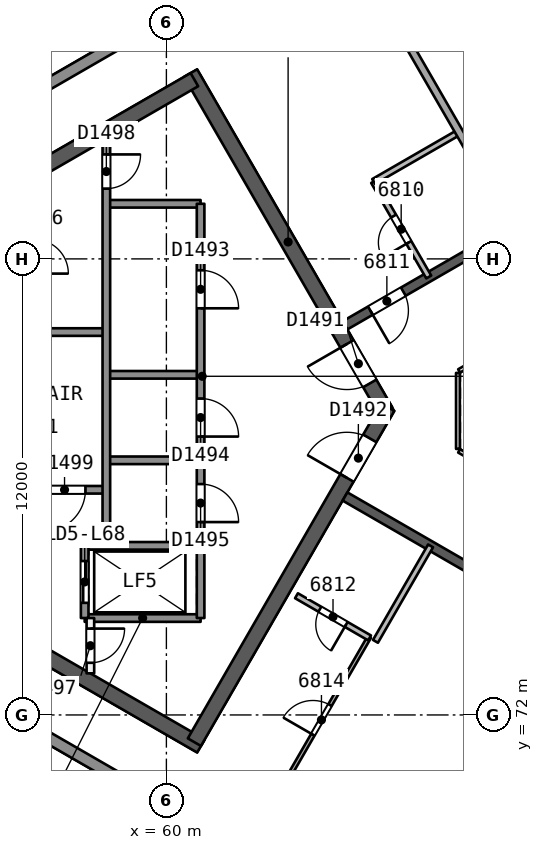
"""IFC4 building model, lengths in metres.
Left out: names, types, materials, properties, quantities, classifications, styles, units other than length and angle.
Written with IfcOpenShell. Run it as: python <this file> out.ifc"""

import sys

from ifc_helpers import new_model, si_unit, direction, frame, frame_2d, origin, place, context, subcontext, project, spatial, rectangle, extrude, element, fill, save


model = new_model("IFC4")
c1 = context("Model", 3, precision=1e-05, world=origin(), true_north=direction((0.0, 1.0)))
c2 = subcontext(c1, "Body", "Model", "MODEL_VIEW")
j1 = project(units=[si_unit("LENGTHUNIT", "METRE"), si_unit("PLANEANGLEUNIT", "RADIAN")], contexts=[c1])
p1 = place(None, origin())
s1 = spatial("IfcSite", under=j1, at=p1, CompositionType="ELEMENT")
p2 = place(p1, origin())
s2 = spatial("IfcBuilding", under=s1, at=p2, CompositionType="ELEMENT")
p3 = place(p2, frame((0.0, 0.0, 277.5)))
s3 = spatial("IfcBuildingStorey", under=s2, at=p3, CompositionType="ELEMENT", Elevation=277.5)
p4 = place(p3, frame((65.769, 80.0, 0.0), z_axis=(0.0, 0.0, 1.0), x_axis=(-0.50000177223, 0.866024380585, 0.0)))
e1 = element("IfcWall", 1, at=p4, inside=s3, PredefinedType="SHEAR", context=c2, shape_type="SweptSolid", body=[
    extrude(rectangle(XDim=10.265, YDim=0.4, at=frame_2d((5.132, 0.0))), origin(), (0.0, 0.0, 1.0), 3.7),
])
p5 = place(p4, frame((0.834, 0.0, 0.0)))
e2 = element("IfcOpeningElement", 2, at=p5, cuts=e1, PredefinedType="OPENING", context=c2, shape_type="SweptSolid", body=[
    extrude(rectangle(XDim=1.2, YDim=2.1, at=frame_2d((0.6, 1.05))), frame((0.0, 0.21, 0.0), z_axis=(0.0, -1.0, 0.0), x_axis=(1.0, 0.0, 0.0)), (0.0, 0.0, 1.0), 0.421),
])
p6 = place(p3, frame((60.737, 88.716, 0.0), z_axis=(0.0, 0.0, 1.0), x_axis=(-0.866028812667, -0.499994095595, 0.0)))
e3 = element("IfcWall", 3, at=p6, inside=s3, PredefinedType="SHEAR", context=c2, shape_type="SweptSolid", body=[
    extrude(rectangle(XDim=14.134, YDim=0.4, at=frame_2d((7.067, 0.0))), origin(), (0.0, 0.0, 1.0), 3.7),
])
p7 = place(p3, frame((48.597, 78.293, 0.0), z_axis=(0.0, 0.0, 1.0), x_axis=(0.866026024469, -0.499998924941, 0.0)))
e4 = element("IfcWall", 4, at=p7, inside=s3, PredefinedType="SHEAR", context=c2, shape_type="SweptSolid", body=[
    extrude(rectangle(XDim=14.218, YDim=0.4, at=frame_2d((7.109, 0.0))), origin(), (0.0, 0.0, 1.0), 3.7),
])
p8 = place(p3, frame((60.737, 71.284, 0.0), z_axis=(0.0, 0.0, 1.0), x_axis=(0.50000547566, 0.866022242388, 0.0)))
e5 = element("IfcWall", 5, at=p8, inside=s3, PredefinedType="SHEAR", context=c2, shape_type="SweptSolid", body=[
    extrude(rectangle(XDim=10.18, YDim=0.4, at=frame_2d((5.09, 0.0))), origin(), (0.0, 0.0, 1.0), 3.7),
])
p9 = place(p8, frame((8.03, 0.0, 0.0)))
e6 = element("IfcOpeningElement", 6, at=p9, cuts=e5, PredefinedType="OPENING", context=c2, shape_type="SweptSolid", body=[
    extrude(rectangle(XDim=1.2, YDim=2.1, at=frame_2d((0.6, 1.05))), frame((0.0, 0.21, 0.0), z_axis=(0.0, -1.0, 0.0), x_axis=(1.0, 0.0, 0.0)), (0.0, 0.0, 1.0), 0.421),
])
p10 = place(p3, frame((78.2, 90.046, 0.0), z_axis=(0.0, 0.0, 1.0), x_axis=(-0.866026492143, -0.499998114903, 0.0)))
e7 = element("IfcWall", 7, at=p10, inside=s3, PredefinedType="SHEAR", context=c2, shape_type="SweptSolid", body=[
    extrude(rectangle(XDim=15.588, YDim=0.25, at=frame_2d((7.794, 0.0))), origin(), (0.0, 0.0, 1.0), 3.3),
])
p11 = place(p10, frame((3.372, 0.0, 0.0)))
e8 = element("IfcOpeningElement", 8, at=p11, cuts=e7, PredefinedType="OPENING", context=c2, shape_type="SweptSolid", body=[
    extrude(rectangle(XDim=1.0, YDim=2.1, at=frame_2d((0.5, 1.05))), frame((0.0, 0.135, 0.0), z_axis=(0.0, -1.0, 0.0), x_axis=(1.0, 0.0, 0.0)), (0.0, 0.0, 1.0), 0.271),
])
p12 = place(p10, frame((8.594, 0.0, 0.0)))
e9 = element("IfcOpeningElement", 9, at=p12, cuts=e7, PredefinedType="OPENING", context=c2, shape_type="SweptSolid", body=[
    extrude(rectangle(XDim=1.0, YDim=2.1, at=frame_2d((0.5, 1.05))), frame((0.0, 0.135, 0.0), z_axis=(0.0, -1.0, 0.0), x_axis=(1.0, 0.0, 0.0)), (0.0, 0.0, 1.0), 0.271),
])
p13 = place(p10, frame((13.816, 0.0, 0.0)))
e10 = element("IfcOpeningElement", 10, at=p13, cuts=e7, PredefinedType="OPENING", context=c2, shape_type="SweptSolid", body=[
    extrude(rectangle(XDim=1.0, YDim=2.1, at=frame_2d((0.5, 1.05))), frame((0.0, 0.135, 0.0), z_axis=(0.0, -1.0, 0.0), x_axis=(1.0, 0.0, 0.0)), (0.0, 0.0, 1.0), 0.271),
])
p14 = place(p3, frame((64.7, 77.748, 0.0), z_axis=(0.0, 0.0, 1.0), x_axis=(0.866026492143, -0.499998114903, 0.0)))
e11 = element("IfcWall", 11, at=p14, inside=s3, PredefinedType="SHEAR", context=c2, shape_type="SweptSolid", body=[
    extrude(rectangle(XDim=15.588, YDim=0.25, at=frame_2d((7.794, 0.0))), origin(), (0.0, 0.0, 1.0), 3.3),
])
p15 = place(p14, frame((4.473, 0.0, 0.0)))
e12 = element("IfcOpeningElement", 12, at=p15, cuts=e11, PredefinedType="OPENING", context=c2, shape_type="SweptSolid", body=[
    extrude(rectangle(XDim=1.0, YDim=2.1, at=frame_2d((0.5, 1.05))), frame((0.0, 0.135, 0.0), z_axis=(0.0, -1.0, 0.0), x_axis=(1.0, 0.0, 0.0)), (0.0, 0.0, 1.0), 0.271),
])
p16 = place(p14, frame((13.917, 0.0, 0.0)))
e13 = element("IfcOpeningElement", 13, at=p16, cuts=e11, PredefinedType="OPENING", context=c2, shape_type="SweptSolid", body=[
    extrude(rectangle(XDim=1.1, YDim=2.1, at=frame_2d((0.55, 1.05))), frame((0.0, 0.135, 0.0), z_axis=(0.0, -1.0, 0.0), x_axis=(1.0, 0.0, 0.0)), (0.0, 0.0, 1.0), 0.271),
])
p17 = place(p3, frame((64.528, 92.838, 0.0), z_axis=(0.0, 0.0, 1.0), x_axis=(0.500006385204, -0.866021717254, 0.0)))
e14 = element("IfcWall", 14, at=p17, inside=s3, PredefinedType="PARTITIONING", context=c2, shape_type="SweptSolid", body=[
    extrude(rectangle(XDim=9.254, YDim=0.2, at=frame_2d((4.627, 0.0))), origin(), (0.0, 0.0, 1.0), 3.3),
])
p18 = place(p3, frame((66.903, 83.524, 0.0), z_axis=(0.0, 0.0, 1.0), x_axis=(-0.499987231761, 0.866032775405, 0.0)))
e15 = element("IfcWall", 15, at=p18, inside=s3, PredefinedType="PARTITIONING", context=c2, shape_type="SweptSolid", body=[
    extrude(rectangle(XDim=2.9, YDim=0.15, at=frame_2d((1.45, 0.0))), origin(), (0.0, 0.0, 1.0), 3.3),
])
p19 = place(p18, frame((1.05, 0.0, 0.0)))
e16 = element("IfcOpeningElement", 16, at=p19, cuts=e15, PredefinedType="OPENING", context=c2, shape_type="SweptSolid", body=[
    extrude(rectangle(XDim=0.8, YDim=2.1, at=frame_2d((0.4, 1.05))), frame((0.0, 0.085, 0.0), z_axis=(0.0, -1.0, 0.0), x_axis=(1.0, 0.0, 0.0)), (0.0, 0.0, 1.0), 0.171),
])
p20 = place(p3, frame((65.453, 86.035, 0.0), z_axis=(0.0, 0.0, 1.0), x_axis=(0.866021400173, 0.500006934395, 0.0)))
e17 = element("IfcWall", 17, at=p20, inside=s3, PredefinedType="PARTITIONING", context=c2, shape_type="SweptSolid", body=[
    extrude(rectangle(XDim=2.6, YDim=0.15, at=frame_2d((1.3, 0.0))), origin(), (0.0, 0.0, 1.0), 3.3),
])
p21 = place(p3, frame((62.154, 68.534, 0.0), z_axis=(0.0, 0.0, 1.0), x_axis=(0.499987773676, 0.866032462541, 0.0)))
e18 = element("IfcWall", 18, at=p21, inside=s3, PredefinedType="PARTITIONING", context=c2, shape_type="SweptSolid", body=[
    extrude(rectangle(XDim=6.372, YDim=0.1, at=frame_2d((3.186, 0.0))), origin(), (0.0, 0.0, 1.0), 3.3),
])
p22 = place(p21, frame((3.403, 0.0, 0.0)))
e19 = element("IfcOpeningElement", 19, at=p22, cuts=e18, PredefinedType="OPENING", context=c2, shape_type="SweptSolid", body=[
    extrude(rectangle(XDim=0.9, YDim=2.1, at=frame_2d((0.45, 1.05))), frame((0.0, 0.061, 0.0), z_axis=(0.0, -1.0, 0.0), x_axis=(1.0, 0.0, 0.0)), (0.0, 0.0, 1.0), 0.121),
])
p23 = place(p3, frame((65.347, 74.026, 0.0), z_axis=(0.0, 0.0, 1.0), x_axis=(-0.866042797968, 0.49996987118, 0.0)))
e20 = element("IfcWall", 20, at=p23, inside=s3, PredefinedType="PARTITIONING", context=c2, shape_type="SweptSolid", body=[
    extrude(rectangle(XDim=2.221, YDim=0.15, at=frame_2d((1.11, 0.0))), origin(), (0.0, 0.0, 1.0), 3.3),
])
p24 = place(p23, frame((0.711, 0.0, 0.0)))
e21 = element("IfcOpeningElement", 21, at=p24, cuts=e20, PredefinedType="OPENING", context=c2, shape_type="SweptSolid", body=[
    extrude(rectangle(XDim=0.8, YDim=2.1, at=frame_2d((0.4, 1.05))), frame((0.0, 0.085, 0.0), z_axis=(0.0, -1.0, 0.0), x_axis=(1.0, 0.0, 0.0)), (0.0, 0.0, 1.0), 0.171),
])
p25 = place(p3, frame((66.952, 76.448, 0.0), z_axis=(0.0, 0.0, 1.0), x_axis=(-0.499987231761, -0.866032775405, 0.0)))
e22 = element("IfcWall", 22, at=p25, inside=s3, PredefinedType="PARTITIONING", context=c2, shape_type="SweptSolid", body=[
    extrude(rectangle(XDim=2.9, YDim=0.15, at=frame_2d((1.45, 0.0))), origin(), (0.0, 0.0, 1.0), 3.3),
])
p26 = place(p3, frame((46.198, 82.427, 0.0), z_axis=(0.0, 0.0, 1.0), x_axis=(0.866024279277, 0.500001947699, 0.0)))
e23 = element("IfcWall", 23, at=p26, inside=s3, PredefinedType="SOLIDWALL", context=c2, shape_type="SweptSolid", body=[
    extrude(rectangle(XDim=47.46, YDim=0.3, at=frame_2d((23.73, 0.0))), origin(), (0.0, 0.0, 1.0), 3.3),
])
p27 = place(p26, frame((17.308, 0.0, 0.0)))
e24 = element("IfcOpeningElement", 24, at=p27, cuts=e23, PredefinedType="OPENING", context=c2, shape_type="SweptSolid", body=[
    extrude(rectangle(XDim=2.4, YDim=2.4, at=frame_2d((1.2, 1.2))), frame((0.0, 0.161, 0.0), z_axis=(0.0, -1.0, 0.0), x_axis=(1.0, 0.0, 0.0)), (0.0, 0.0, 1.0), 0.321),
])
p28 = place(p26, frame((22.53, 0.0, 0.0)))
e25 = element("IfcOpeningElement", 25, at=p28, cuts=e23, PredefinedType="OPENING", context=c2, shape_type="SweptSolid", body=[
    extrude(rectangle(XDim=2.4, YDim=2.4, at=frame_2d((1.2, 1.2))), frame((0.0, 0.161, 0.0), z_axis=(0.0, -1.0, 0.0), x_axis=(1.0, 0.0, 0.0)), (0.0, 0.0, 1.0), 0.321),
])
p29 = place(p26, frame((27.752, 0.0, 0.0)))
e26 = element("IfcOpeningElement", 26, at=p29, cuts=e23, PredefinedType="OPENING", context=c2, shape_type="SweptSolid", body=[
    extrude(rectangle(XDim=2.4, YDim=2.4, at=frame_2d((1.2, 1.2))), frame((0.0, 0.161, 0.0), z_axis=(0.0, -1.0, 0.0), x_axis=(1.0, 0.0, 0.0)), (0.0, 0.0, 1.0), 0.321),
])
p30 = place(p3, frame((87.299, 53.843, 0.0), z_axis=(0.0, 0.0, 1.0), x_axis=(-0.866024279277, 0.500001947699, 0.0)))
e27 = element("IfcWall", 27, at=p30, inside=s3, PredefinedType="SOLIDWALL", context=c2, shape_type="SweptSolid", body=[
    extrude(rectangle(XDim=47.46, YDim=0.3, at=frame_2d((23.73, 0.0))), origin(), (0.0, 0.0, 1.0), 3.3),
])
p31 = place(p30, frame((17.308, 0.0, 0.0)))
e28 = element("IfcOpeningElement", 28, at=p31, cuts=e27, PredefinedType="OPENING", context=c2, shape_type="SweptSolid", body=[
    extrude(rectangle(XDim=2.4, YDim=2.4, at=frame_2d((1.2, 1.2))), frame((0.0, 0.161, 0.0), z_axis=(0.0, -1.0, 0.0), x_axis=(1.0, 0.0, 0.0)), (0.0, 0.0, 1.0), 0.321),
])
p32 = place(p30, frame((37.135, 0.0, 0.0)))
e29 = element("IfcOpeningElement", 29, at=p32, cuts=e27, PredefinedType="OPENING", context=c2, shape_type="SweptSolid", body=[
    extrude(rectangle(XDim=2.4, YDim=2.4, at=frame_2d((1.2, 1.2))), frame((0.0, 0.161, 0.0), z_axis=(0.0, -1.0, 0.0), x_axis=(1.0, 0.0, 0.0)), (0.0, 0.0, 1.0), 0.321),
])
p33 = place(p30, frame((23.901, 0.0, 0.0)))
e30 = element("IfcOpeningElement", 30, at=p33, cuts=e27, PredefinedType="OPENING", context=c2, shape_type="SweptSolid", body=[
    extrude(rectangle(XDim=2.4, YDim=2.4, at=frame_2d((1.2, 1.2))), frame((0.0, 0.161, 0.0), z_axis=(0.0, -1.0, 0.0), x_axis=(1.0, 0.0, 0.0)), (0.0, 0.0, 1.0), 0.321),
])
p34 = place(p3, frame((60.9, 85.45, 0.0), z_axis=(0.0, 0.0, 1.0), x_axis=(-1.0, 0.0, 0.0)))
e31 = element("IfcWall", 31, at=p34, inside=s3, PredefinedType="SOLIDWALL", context=c2, shape_type="SweptSolid", body=[
    extrude(rectangle(XDim=2.48, YDim=0.2, at=frame_2d((1.24, 0.0))), origin(), (0.0, 0.0, 1.0), 3.3),
])
p35 = place(p3, frame((58.42, 82.075, 0.0), z_axis=(0.0, 0.0, 1.0), x_axis=(-1.0, 0.0, 0.0)))
e32 = element("IfcWall", 32, at=p35, inside=s3, PredefinedType="SOLIDWALL", context=c2, shape_type="SweptSolid", body=[
    extrude(rectangle(XDim=7.7, YDim=0.2, at=frame_2d((3.85, 0.0))), origin(), (0.0, 0.0, 1.0), 3.3),
])
for number, where, z_axis, x_axis in (
    (33, (60.9, 80.95, 0.0), (0.0, 0.0, 1.0), (-1.0, 0.0, 0.0)),
    (34, (60.9, 78.7, 0.0), (0.0, 0.0, 1.0), (-1.0, 0.0, 0.0)),
):
    element("IfcWall", number, at=place(p3, frame(where, z_axis=z_axis, x_axis=x_axis)), inside=s3, PredefinedType="SOLIDWALL", context=c2, shape_type="SweptSolid", body=[
        extrude(rectangle(XDim=2.48, YDim=0.2, at=frame_2d((1.24, 0.0))), origin(), (0.0, 0.0, 1.0), 3.3),
    ])
p36 = place(p3, frame((58.42, 77.925, 0.0), z_axis=(0.0, 0.0, 1.0), x_axis=(-1.0, 0.0, 0.0)))
e35 = element("IfcWall", 35, at=p36, inside=s3, PredefinedType="SOLIDWALL", context=c2, shape_type="SweptSolid", body=[
    extrude(rectangle(XDim=7.7, YDim=0.2, at=frame_2d((3.85, 0.0))), origin(), (0.0, 0.0, 1.0), 3.3),
])
p37 = place(p36, frame((0.55, 0.0, 0.0)))
e36 = element("IfcOpeningElement", 36, at=p37, cuts=e35, PredefinedType="OPENING", context=c2, shape_type="SweptSolid", body=[
    extrude(rectangle(XDim=1.1, YDim=2.1, at=frame_2d((0.55, 1.05))), frame((0.0, 0.11, 0.0), z_axis=(0.0, -1.0, 0.0), x_axis=(1.0, 0.0, 0.0)), (0.0, 0.0, 1.0), 0.221),
])
for number, where, z_axis, x_axis in (
    (37, (60.9, 76.45, 0.0), (0.0, 0.0, 1.0), (-1.0, 0.0, 0.0)),
    (38, (60.9, 74.55, 0.0), (0.0, 0.0, 1.0), (-1.0, 0.0, 0.0)),
):
    element("IfcWall", number, at=place(p3, frame(where, z_axis=z_axis, x_axis=x_axis)), inside=s3, PredefinedType="SOLIDWALL", context=c2, shape_type="SweptSolid", body=[
        extrude(rectangle(XDim=3.05, YDim=0.2, at=frame_2d((1.525, 0.0))), origin(), (0.0, 0.0, 1.0), 3.3),
    ])
p38 = place(p3, frame((60.9, 85.45, 0.0), z_axis=(0.0, 0.0, 1.0), x_axis=(0.0, -1.0, 0.0)))
e39 = element("IfcWall", 39, at=p38, inside=s3, PredefinedType="SOLIDWALL", context=c2, shape_type="SweptSolid", body=[
    extrude(rectangle(XDim=10.9, YDim=0.2, at=frame_2d((5.45, 0.0))), origin(), (0.0, 0.0, 1.0), 3.3),
])
p39 = place(p38, frame((1.75, 0.0, 0.0)))
e40 = element("IfcOpeningElement", 40, at=p39, cuts=e39, PredefinedType="OPENING", context=c2, shape_type="SweptSolid", body=[
    extrude(rectangle(XDim=1.0, YDim=2.1, at=frame_2d((0.5, 1.05))), frame((0.0, 0.11, 0.0), z_axis=(0.0, -1.0, 0.0), x_axis=(1.0, 0.0, 0.0)), (0.0, 0.0, 1.0), 0.221),
])
p40 = place(p38, frame((5.125, 0.0, 0.0)))
e41 = element("IfcOpeningElement", 41, at=p40, cuts=e39, PredefinedType="OPENING", context=c2, shape_type="SweptSolid", body=[
    extrude(rectangle(XDim=1.0, YDim=2.1, at=frame_2d((0.5, 1.05))), frame((0.0, 0.11, 0.0), z_axis=(0.0, -1.0, 0.0), x_axis=(1.0, 0.0, 0.0)), (0.0, 0.0, 1.0), 0.221),
])
p41 = place(p38, frame((7.375, 0.0, 0.0)))
e42 = element("IfcOpeningElement", 42, at=p41, cuts=e39, PredefinedType="OPENING", context=c2, shape_type="SweptSolid", body=[
    extrude(rectangle(XDim=1.0, YDim=2.1, at=frame_2d((0.5, 1.05))), frame((0.0, 0.11, 0.0), z_axis=(0.0, -1.0, 0.0), x_axis=(1.0, 0.0, 0.0)), (0.0, 0.0, 1.0), 0.221),
])
p42 = place(p3, frame((58.42, 87.148, 0.0), z_axis=(0.0, 0.0, 1.0), x_axis=(0.0, -1.0, 0.0)))
e43 = element("IfcWall", 43, at=p42, inside=s3, PredefinedType="SOLIDWALL", context=c2, shape_type="SweptSolid", body=[
    extrude(rectangle(XDim=10.698, YDim=0.2, at=frame_2d((5.349, 0.0))), origin(), (0.0, 0.0, 1.0), 3.3),
])
p43 = place(p42, frame((0.399, 0.0, 0.0)))
e44 = element("IfcOpeningElement", 44, at=p43, cuts=e43, PredefinedType="OPENING", context=c2, shape_type="SweptSolid", body=[
    extrude(rectangle(XDim=0.9, YDim=2.1, at=frame_2d((0.45, 1.05))), frame((0.0, 0.11, 0.0), z_axis=(0.0, -1.0, 0.0), x_axis=(1.0, 0.0, 0.0)), (0.0, 0.0, 1.0), 0.221),
])
p44 = place(p3, frame((58.0, 74.55, 0.0), z_axis=(0.0, 0.0, 1.0), x_axis=(0.0, -1.0, 0.0)))
e45 = element("IfcWall", 45, at=p44, inside=s3, PredefinedType="PARTITIONING", context=c2, shape_type="SweptSolid", body=[
    extrude(rectangle(XDim=1.455, YDim=0.2, at=frame_2d((0.728, 0.0))), origin(), (0.0, 0.0, 1.0), 3.3),
])
p45 = place(p44, frame((0.278, 0.0, 0.0)))
e46 = element("IfcOpeningElement", 46, at=p45, cuts=e45, PredefinedType="OPENING", context=c2, shape_type="SweptSolid", body=[
    extrude(rectangle(XDim=0.9, YDim=2.1, at=frame_2d((0.45, 1.05))), frame((0.0, 0.11, 0.0), z_axis=(0.0, -1.0, 0.0), x_axis=(1.0, 0.0, 0.0)), (0.0, 0.0, 1.0), 0.221),
])
p46 = place(p3, frame((57.85, 76.45, 0.0), z_axis=(0.0, 0.0, 1.0), x_axis=(0.0, -1.0, 0.0)))
e47 = element("IfcWall", 47, at=p46, inside=s3, PredefinedType="SOLIDWALL", context=c2, shape_type="SweptSolid", body=[
    extrude(rectangle(XDim=1.9, YDim=0.2, at=frame_2d((0.95, 0.0))), origin(), (0.0, 0.0, 1.0), 3.3),
])
p47 = place(p46, frame((0.4, 0.0, 0.0)))
e48 = element("IfcOpeningElement", 48, at=p47, cuts=e47, PredefinedType="OPENING", context=c2, shape_type="SweptSolid", body=[
    extrude(rectangle(XDim=1.1, YDim=2.1, at=frame_2d((0.55, 1.05))), frame((0.0, 0.11, 0.0), z_axis=(0.0, -1.0, 0.0), x_axis=(1.0, 0.0, 0.0)), (0.0, 0.0, 1.0), 0.221),
])
p48 = place(p3, frame((77.738, 86.846, 0.0), z_axis=(0.0, 0.0, 1.0), x_axis=(-0.866026658274, -0.499997827154, 0.0)))
e49 = element("IfcWall", 49, at=p48, inside=s3, PredefinedType="PARTITIONING", context=c2, shape_type="SweptSolid", body=[
    extrude(rectangle(XDim=11.588, YDim=0.1, at=frame_2d((5.794, 0.0))), origin(), (0.0, 0.0, 1.0), 3.3),
])
p49 = place(p3, frame((67.672, 81.0, 0.0), z_axis=(0.0, 0.0, 1.0), x_axis=(0.0, -1.0, 0.0)))
e50 = element("IfcWall", 50, at=p49, inside=s3, PredefinedType="PARTITIONING", context=c2, shape_type="SweptSolid", body=[
    extrude(rectangle(XDim=2.0, YDim=0.1, at=frame_2d((1.0, 0.0))), origin(), (0.0, 0.0, 1.0), 3.3),
])
p50 = place(p3, frame((67.702, 78.948, 0.0), z_axis=(0.0, 0.0, 1.0), x_axis=(0.866026658274, -0.499997827154, 0.0)))
e51 = element("IfcWall", 51, at=p50, inside=s3, PredefinedType="PARTITIONING", context=c2, shape_type="SweptSolid", body=[
    extrude(rectangle(XDim=11.588, YDim=0.1, at=frame_2d((5.794, 0.0))), origin(), (0.0, 0.0, 1.0), 3.3),
])
p51 = place(p19, origin())
e52 = element("IfcDoor", 52, at=p51, inside=s3, OperationType="SINGLE_SWING_LEFT", PredefinedType="NOTDEFINED", context=c2, shape_type="SweptSolid", body=[
    extrude(rectangle(XDim=0.8, YDim=2.1, at=frame_2d((0.4, 1.05))), frame((0.0, 0.025, 0.0), z_axis=(0.0, -1.0, 0.0), x_axis=(1.0, 0.0, 0.0)), (0.0, 0.0, 1.0), 0.05),
])
fill(e16, e52)
p52 = place(p13, origin())
e53 = element("IfcDoor", 53, at=p52, inside=s3, OperationType="SINGLE_SWING_RIGHT", PredefinedType="NOTDEFINED", context=c2, shape_type="SweptSolid", body=[
    extrude(rectangle(XDim=1.0, YDim=2.1, at=frame_2d((0.5, 1.05))), frame((0.0, 0.025, 0.0), z_axis=(0.0, -1.0, 0.0), x_axis=(1.0, 0.0, 0.0)), (0.0, 0.0, 1.0), 0.05),
])
fill(e10, e53)
p53 = place(p24, origin())
e54 = element("IfcDoor", 54, at=p53, inside=s3, OperationType="SINGLE_SWING_LEFT", PredefinedType="NOTDEFINED", context=c2, shape_type="SweptSolid", body=[
    extrude(rectangle(XDim=0.8, YDim=2.1, at=frame_2d((0.4, 1.05))), frame((0.0, 0.025, 0.0), z_axis=(0.0, -1.0, 0.0), x_axis=(1.0, 0.0, 0.0)), (0.0, 0.0, 1.0), 0.05),
])
fill(e21, e54)
p54 = place(p22, origin())
e55 = element("IfcDoor", 55, at=p54, inside=s3, OperationType="SINGLE_SWING_LEFT", PredefinedType="NOTDEFINED", context=c2, shape_type="SweptSolid", body=[
    extrude(rectangle(XDim=0.9, YDim=2.1, at=frame_2d((0.45, 1.05))), frame((0.0, 0.025, 0.0), z_axis=(0.0, -1.0, 0.0), x_axis=(1.0, 0.0, 0.0)), (0.0, 0.0, 1.0), 0.05),
])
fill(e19, e55)
p55 = place(p5, origin())
e56 = element("IfcDoor", 56, at=p55, inside=s3, OperationType="SINGLE_SWING_RIGHT", PredefinedType="NOTDEFINED", context=c2, shape_type="SweptSolid", body=[
    extrude(rectangle(XDim=1.2, YDim=2.1, at=frame_2d((0.6, 1.05))), frame((0.0, 0.025, 0.0), z_axis=(0.0, -1.0, 0.0), x_axis=(1.0, 0.0, 0.0)), (0.0, 0.0, 1.0), 0.05),
])
fill(e2, e56)
p56 = place(p9, origin())
e57 = element("IfcDoor", 57, at=p56, inside=s3, OperationType="SINGLE_SWING_LEFT", PredefinedType="NOTDEFINED", context=c2, shape_type="SweptSolid", body=[
    extrude(rectangle(XDim=1.2, YDim=2.1, at=frame_2d((0.6, 1.05))), frame((0.0, 0.025, 0.0), z_axis=(0.0, -1.0, 0.0), x_axis=(1.0, 0.0, 0.0)), (0.0, 0.0, 1.0), 0.05),
])
fill(e6, e57)
p57 = place(p47, origin())
e58 = element("IfcDoor", 58, at=p57, inside=s3, OperationType="SLIDING_TO_RIGHT", PredefinedType="NOTDEFINED", context=c2, shape_type="SweptSolid", body=[
    extrude(rectangle(XDim=1.1, YDim=2.1, at=frame_2d((0.55, 1.05))), frame((0.0, 0.025, 0.0), z_axis=(0.0, -1.0, 0.0), x_axis=(1.0, 0.0, 0.0)), (0.0, 0.0, 1.0), 0.05),
])
fill(e48, e58)
p58 = place(p39, origin())
e59 = element("IfcDoor", 59, at=p58, inside=s3, OperationType="SINGLE_SWING_RIGHT", PredefinedType="NOTDEFINED", context=c2, shape_type="SweptSolid", body=[
    extrude(rectangle(XDim=1.0, YDim=2.1, at=frame_2d((0.5, 1.05))), frame((0.0, 0.025, 0.0), z_axis=(0.0, -1.0, 0.0), x_axis=(1.0, 0.0, 0.0)), (0.0, 0.0, 1.0), 0.05),
])
fill(e40, e59)
p59 = place(p40, origin())
e60 = element("IfcDoor", 60, at=p59, inside=s3, OperationType="SINGLE_SWING_RIGHT", PredefinedType="NOTDEFINED", context=c2, shape_type="SweptSolid", body=[
    extrude(rectangle(XDim=1.0, YDim=2.1, at=frame_2d((0.5, 1.05))), frame((0.0, 0.025, 0.0), z_axis=(0.0, -1.0, 0.0), x_axis=(1.0, 0.0, 0.0)), (0.0, 0.0, 1.0), 0.05),
])
fill(e41, e60)
p60 = place(p41, origin())
e61 = element("IfcDoor", 61, at=p60, inside=s3, OperationType="SINGLE_SWING_RIGHT", PredefinedType="NOTDEFINED", context=c2, shape_type="SweptSolid", body=[
    extrude(rectangle(XDim=1.0, YDim=2.1, at=frame_2d((0.5, 1.05))), frame((0.0, 0.025, 0.0), z_axis=(0.0, -1.0, 0.0), x_axis=(1.0, 0.0, 0.0)), (0.0, 0.0, 1.0), 0.05),
])
fill(e42, e61)
p61 = place(p45, origin())
e62 = element("IfcDoor", 62, at=p61, inside=s3, OperationType="SINGLE_SWING_LEFT", PredefinedType="NOTDEFINED", context=c2, shape_type="SweptSolid", body=[
    extrude(rectangle(XDim=0.9, YDim=2.1, at=frame_2d((0.45, 1.05))), frame((0.0, 0.025, 0.0), z_axis=(0.0, -1.0, 0.0), x_axis=(1.0, 0.0, 0.0)), (0.0, 0.0, 1.0), 0.05),
])
fill(e46, e62)
p62 = place(p43, origin())
e63 = element("IfcDoor", 63, at=p62, inside=s3, OperationType="SINGLE_SWING_LEFT", PredefinedType="NOTDEFINED", context=c2, shape_type="SweptSolid", body=[
    extrude(rectangle(XDim=0.9, YDim=2.1, at=frame_2d((0.45, 1.05))), frame((0.0, 0.025, 0.0), z_axis=(0.0, -1.0, 0.0), x_axis=(1.0, 0.0, 0.0)), (0.0, 0.0, 1.0), 0.05),
])
fill(e44, e63)
p63 = place(p37, origin())
e64 = element("IfcDoor", 64, at=p63, inside=s3, OperationType="SINGLE_SWING_RIGHT", PredefinedType="NOTDEFINED", context=c2, shape_type="SweptSolid", body=[
    extrude(rectangle(XDim=1.1, YDim=2.1, at=frame_2d((0.55, 1.05))), frame((0.0, 0.025, 0.0), z_axis=(0.0, -1.0, 0.0), x_axis=(1.0, 0.0, 0.0)), (0.0, 0.0, 1.0), 0.05),
])
fill(e36, e64)
save(model, sys.argv[1])
